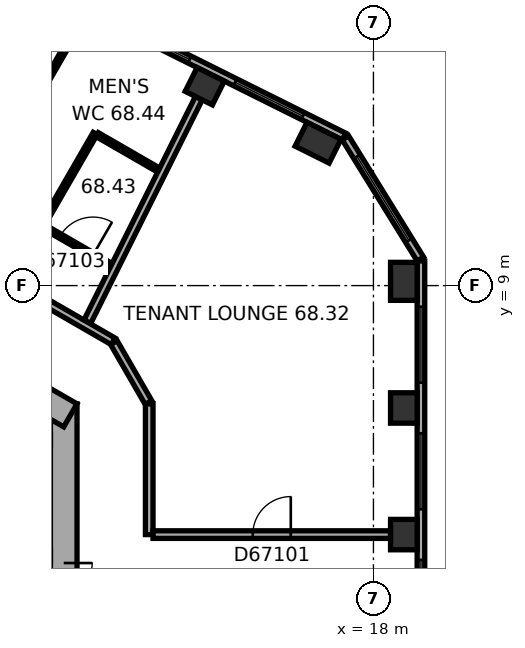
"""IFC4 building model, lengths in metres.
Left out: names, types, materials, properties, quantities, classifications, styles, units other than length and angle.
Written with IfcOpenShell. Run it as: python <this file> out.ifc"""

import sys

from ifc_helpers import new_model, si_unit, direction, frame, frame_2d, origin, origin_2d, place, context, subcontext, project, spatial, rectangle, extrude, element, fill, save


model = new_model("IFC4")
c1 = context("Model", 3, precision=1e-05, world=origin(), true_north=direction((0.0, 1.0)))
c2 = subcontext(c1, "Body", "Model", "MODEL_VIEW")
j1 = project(units=[si_unit("LENGTHUNIT", "METRE"), si_unit("PLANEANGLEUNIT", "RADIAN")], contexts=[c1])
p1 = place(None, origin())
s1 = spatial("IfcSite", under=j1, at=p1, CompositionType="ELEMENT")
p2 = place(p1, origin())
s2 = spatial("IfcBuilding", under=s1, at=p2, CompositionType="ELEMENT")
p3 = place(p2, frame((0.0, 0.0, 274.6)))
s3 = spatial("IfcBuildingStorey", under=s2, at=p3, CompositionType="ELEMENT", Elevation=274.6)
for number, where, z_axis, x_axis in (
    (1, (18.8, 2.448, 0.0), (0.0, 0.0, 1.0), (0.0, 1.0, 0.0)),
    (2, (18.8, 5.78, 0.0), (0.0, 0.0, 1.0), (0.0, 1.0, 0.0)),
):
    element("IfcColumn", number, at=place(p3, frame(where, z_axis=z_axis, x_axis=x_axis)), inside=s3, PredefinedType="COLUMN", context=c2, shape_type="SweptSolid", body=[
        extrude(rectangle(XDim=0.8, YDim=0.7, at=origin_2d()), origin(), (0.0, 0.0, 1.0), 3.7),
    ])
for number, where, z_axis, x_axis in (
    (3, (18.8, 9.112, 0.0), (0.0, 0.0, 1.0), (0.0, 1.0, 0.0)),
    (4, (16.543, 12.759, 0.0), (0.0, 0.0, 1.0), (-0.895, 0.446, 0.0)),
):
    element("IfcColumn", number, at=place(p3, frame(where, z_axis=z_axis, x_axis=x_axis)), inside=s3, PredefinedType="COLUMN", context=c2, shape_type="SweptSolid", body=[
        extrude(rectangle(XDim=1.0, YDim=0.7, at=origin_2d()), origin(), (0.0, 0.0, 1.0), 3.7),
    ])
p4 = place(p3, frame((13.561, 14.246, 0.0), z_axis=(0.0, 0.0, 1.0), x_axis=(-0.894934361602, 0.44619781311, 0.0)))
e5 = element("IfcColumn", 5, at=p4, inside=s3, PredefinedType="COLUMN", context=c2, shape_type="SweptSolid", body=[
    extrude(rectangle(XDim=0.8, YDim=0.7, at=origin_2d()), origin(), (0.0, 0.0, 1.0), 3.7),
])
p5 = place(p3, frame((9.85, -5.889, 0.0), z_axis=(0.0, 0.0, 1.0), x_axis=(0.0, 1.0, 0.0)))
e6 = element("IfcWall", 6, at=p5, inside=s3, PredefinedType="SHEAR", context=c2, shape_type="SweptSolid", body=[
    extrude(rectangle(XDim=11.778, YDim=0.7, at=frame_2d((5.889, 0.0))), origin(), (0.0, 0.0, 1.0), 3.7),
])
p6 = place(p5, frame((6.089, 0.0, 0.0)))
e7 = element("IfcOpeningElement", 7, at=p6, cuts=e6, PredefinedType="OPENING", context=c2, shape_type="SweptSolid", body=[
    extrude(rectangle(XDim=1.5, YDim=2.1, at=frame_2d((0.75, 1.05))), frame((0.0, 0.36, 0.0), z_axis=(0.0, -1.0, 0.0), x_axis=(1.0, 0.0, 0.0)), (0.0, 0.0, 1.0), 0.72),
])
p7 = place(p5, frame((1.639, 0.0, 0.0)))
e8 = element("IfcOpeningElement", 8, at=p7, cuts=e6, PredefinedType="OPENING", context=c2, shape_type="SweptSolid", body=[
    extrude(rectangle(XDim=0.9, YDim=2.1, at=frame_2d((0.45, 1.05))), frame((0.0, 0.36, 0.0), z_axis=(0.0, -1.0, 0.0), x_axis=(1.0, 0.0, 0.0)), (0.0, 0.0, 1.0), 0.72),
])
p8 = place(p5, frame((4.239, 0.0, 0.0)))
e9 = element("IfcOpeningElement", 9, at=p8, cuts=e6, PredefinedType="OPENING", context=c2, shape_type="SweptSolid", body=[
    extrude(rectangle(XDim=0.9, YDim=2.1, at=frame_2d((0.45, 1.05))), frame((0.0, 0.36, 0.0), z_axis=(0.0, -1.0, 0.0), x_axis=(1.0, 0.0, 0.0)), (0.0, 0.0, 1.0), 0.72),
])
p9 = place(p3, frame((10.025, 5.586, 0.0), z_axis=(0.0, 0.0, 1.0), x_axis=(-0.866026453023, 0.499998182661, 0.0)))
e10 = element("IfcWall", 10, at=p9, inside=s3, PredefinedType="SHEAR", context=c2, shape_type="SweptSolid", body=[
    extrude(rectangle(XDim=11.778, YDim=0.7, at=frame_2d((5.889, 0.0))), origin(), (0.0, 0.0, 1.0), 3.7),
])
p10 = place(p9, frame((5.139, 0.0, 0.0)))
e11 = element("IfcOpeningElement", 11, at=p10, cuts=e10, PredefinedType="OPENING", context=c2, shape_type="SweptSolid", body=[
    extrude(rectangle(XDim=0.9, YDim=2.1, at=frame_2d((0.45, 1.05))), frame((0.0, 0.36, 0.0), z_axis=(0.0, -1.0, 0.0), x_axis=(1.0, 0.0, 0.0)), (0.0, 0.0, 1.0), 0.72),
])
p11 = place(p3, frame((19.25, -8.084, 0.0), z_axis=(0.0, 0.0, 1.0), x_axis=(0.0, 1.0, 0.0)))
e12 = element("IfcWall", 12, at=p11, inside=s3, PredefinedType="STANDARD", context=c2, shape_type="SweptSolid", body=[
    extrude(rectangle(XDim=17.731, YDim=0.2, at=frame_2d((8.866, 0.0))), origin(), (0.0, 0.0, 1.0), 3.7),
])
p12 = place(p11, frame((1.203, 0.0, 0.9)))
e13 = element("IfcOpeningElement", 13, at=p12, cuts=e12, PredefinedType="OPENING", context=c2, shape_type="SweptSolid", body=[
    extrude(rectangle(XDim=2.0, YDim=2.0, at=frame_2d((1.0, 1.0))), frame((0.0, 0.11, 0.0), z_axis=(0.0, -1.0, 0.0), x_axis=(1.0, 0.0, 0.0)), (0.0, 0.0, 1.0), 0.22),
])
p13 = place(p11, frame((4.535, 0.0, 0.9)))
e14 = element("IfcOpeningElement", 14, at=p13, cuts=e12, PredefinedType="OPENING", context=c2, shape_type="SweptSolid", body=[
    extrude(rectangle(XDim=2.0, YDim=2.0, at=frame_2d((1.0, 1.0))), frame((0.0, 0.11, 0.0), z_axis=(0.0, -1.0, 0.0), x_axis=(1.0, 0.0, 0.0)), (0.0, 0.0, 1.0), 0.22),
])
p14 = place(p11, frame((7.866, 0.0, 0.9)))
e15 = element("IfcOpeningElement", 15, at=p14, cuts=e12, PredefinedType="OPENING", context=c2, shape_type="SweptSolid", body=[
    extrude(rectangle(XDim=2.0, YDim=2.0, at=frame_2d((1.0, 1.0))), frame((0.0, 0.11, 0.0), z_axis=(0.0, -1.0, 0.0), x_axis=(1.0, 0.0, 0.0)), (0.0, 0.0, 1.0), 0.22),
])
p15 = place(p11, frame((11.198, 0.0, 0.9)))
e16 = element("IfcOpeningElement", 16, at=p15, cuts=e12, PredefinedType="OPENING", context=c2, shape_type="SweptSolid", body=[
    extrude(rectangle(XDim=2.0, YDim=2.0, at=frame_2d((1.0, 1.0))), frame((0.0, 0.11, 0.0), z_axis=(0.0, -1.0, 0.0), x_axis=(1.0, 0.0, 0.0)), (0.0, 0.0, 1.0), 0.22),
])
p16 = place(p11, frame((14.53, 0.0, 0.9)))
e17 = element("IfcOpeningElement", 17, at=p16, cuts=e12, PredefinedType="OPENING", context=c2, shape_type="SweptSolid", body=[
    extrude(rectangle(XDim=2.0, YDim=2.0, at=frame_2d((1.0, 1.0))), frame((0.0, 0.11, 0.0), z_axis=(0.0, -1.0, 0.0), x_axis=(1.0, 0.0, 0.0)), (0.0, 0.0, 1.0), 0.22),
])
p17 = place(p3, frame((19.235, 9.7, 0.0), z_axis=(0.0, 0.0, 1.0), x_axis=(-0.526233475464, 0.850340125656, 0.0)))
e18 = element("IfcWall", 18, at=p17, inside=s3, PredefinedType="STANDARD", context=c2, shape_type="SweptSolid", body=[
    extrude(rectangle(XDim=3.747, YDim=0.2, at=frame_2d((1.874, 0.0))), origin(), (0.0, 0.0, 1.0), 3.7),
])
p18 = place(p17, frame((0.573, 0.0, 0.9)))
e19 = element("IfcOpeningElement", 19, at=p18, cuts=e18, PredefinedType="OPENING", context=c2, shape_type="SweptSolid", body=[
    extrude(rectangle(XDim=2.6, YDim=2.0, at=frame_2d((1.3, 1.0))), frame((0.0, 0.11, 0.0), z_axis=(0.0, -1.0, 0.0), x_axis=(1.0, 0.0, 0.0)), (0.0, 0.0, 1.0), 0.22),
])
p19 = place(p3, frame((17.223, 12.923, 0.0), z_axis=(0.0, 0.0, 1.0), x_axis=(-0.894930561148, 0.44620543556, 0.0)))
e20 = element("IfcWall", 20, at=p19, inside=s3, PredefinedType="STANDARD", context=c2, shape_type="SweptSolid", body=[
    extrude(rectangle(XDim=17.731, YDim=0.2, at=frame_2d((8.866, 0.0))), origin(), (0.0, 0.0, 1.0), 3.7),
])
p20 = place(p19, frame((1.202, 0.0, 0.9)))
e21 = element("IfcOpeningElement", 21, at=p20, cuts=e20, PredefinedType="OPENING", context=c2, shape_type="SweptSolid", body=[
    extrude(rectangle(XDim=2.0, YDim=2.0, at=frame_2d((1.0, 1.0))), frame((0.0, 0.11, 0.0), z_axis=(0.0, -1.0, 0.0), x_axis=(1.0, 0.0, 0.0)), (0.0, 0.0, 1.0), 0.22),
])
p21 = place(p19, frame((4.533, 0.0, 0.9)))
e22 = element("IfcOpeningElement", 22, at=p21, cuts=e20, PredefinedType="OPENING", context=c2, shape_type="SweptSolid", body=[
    extrude(rectangle(XDim=2.0, YDim=2.0, at=frame_2d((1.0, 1.0))), frame((0.0, 0.11, 0.0), z_axis=(0.0, -1.0, 0.0), x_axis=(1.0, 0.0, 0.0)), (0.0, 0.0, 1.0), 0.22),
])
p22 = place(p19, frame((7.865, 0.0, 0.9)))
e23 = element("IfcOpeningElement", 23, at=p22, cuts=e20, PredefinedType="OPENING", context=c2, shape_type="SweptSolid", body=[
    extrude(rectangle(XDim=2.0, YDim=2.0, at=frame_2d((1.0, 1.0))), frame((0.0, 0.11, 0.0), z_axis=(0.0, -1.0, 0.0), x_axis=(1.0, 0.0, 0.0)), (0.0, 0.0, 1.0), 0.22),
])
p23 = place(p19, frame((11.197, 0.0, 0.9)))
e24 = element("IfcOpeningElement", 24, at=p23, cuts=e20, PredefinedType="OPENING", context=c2, shape_type="SweptSolid", body=[
    extrude(rectangle(XDim=2.0, YDim=2.0, at=frame_2d((1.0, 1.0))), frame((0.0, 0.11, 0.0), z_axis=(0.0, -1.0, 0.0), x_axis=(1.0, 0.0, 0.0)), (0.0, 0.0, 1.0), 0.22),
])
p24 = place(p19, frame((14.528, 0.0, 0.9)))
e25 = element("IfcOpeningElement", 25, at=p24, cuts=e20, PredefinedType="OPENING", context=c2, shape_type="SweptSolid", body=[
    extrude(rectangle(XDim=2.0, YDim=2.0, at=frame_2d((1.0, 1.0))), frame((0.0, 0.11, 0.0), z_axis=(0.0, -1.0, 0.0), x_axis=(1.0, 0.0, 0.0)), (0.0, 0.0, 1.0), 0.22),
])
p25 = place(p3, frame((10.091, 15.585, 0.0), z_axis=(0.0, 0.0, 1.0), x_axis=(-0.499969186147, -0.86604319344, 0.0)))
e26 = element("IfcWall", 26, at=p25, inside=s3, PredefinedType="PARTITIONING", context=c2, shape_type="SweptSolid", body=[
    extrude(rectangle(XDim=4.682, YDim=0.12, at=frame_2d((2.341, 0.0))), origin(), (0.0, 0.0, 1.0), 2.65),
])
p26 = place(p3, frame((10.679, 13.003, 0.0), z_axis=(0.0, 0.0, 1.0), x_axis=(-0.500048966069, -0.865997131366, 0.0)))
e27 = element("IfcWall", 27, at=p26, inside=s3, PredefinedType="PARTITIONING", context=c2, shape_type="SweptSolid", body=[
    extrude(rectangle(XDim=2.74, YDim=0.12, at=frame_2d((1.37, 0.0))), origin(), (0.0, 0.0, 1.0), 3.35),
])
p27 = place(p3, frame((11.097, 9.528, 0.0), z_axis=(0.0, 0.0, 1.0), x_axis=(-0.866039938485, 0.499974824316, 0.0)))
e28 = element("IfcWall", 28, at=p27, inside=s3, PredefinedType="PARTITIONING", context=c2, shape_type="SweptSolid", body=[
    extrude(rectangle(XDim=6.476, YDim=0.12, at=frame_2d((3.238, 0.0))), origin(), (0.0, 0.0, 1.0), 3.35),
])
p28 = place(p27, frame((0.55, 0.0, 0.0)))
e29 = element("IfcOpeningElement", 29, at=p28, cuts=e28, PredefinedType="OPENING", context=c2, shape_type="SweptSolid", body=[
    extrude(rectangle(XDim=1.0, YDim=2.1, at=frame_2d((0.5, 1.05))), frame((0.0, 0.07, 0.0), z_axis=(0.0, -1.0, 0.0), x_axis=(1.0, 0.0, 0.0)), (0.0, 0.0, 1.0), 0.14),
])
p29 = place(p27, frame((2.55, 0.0, 0.0)))
e30 = element("IfcOpeningElement", 30, at=p29, cuts=e28, PredefinedType="OPENING", context=c2, shape_type="SweptSolid", body=[
    extrude(rectangle(XDim=0.9, YDim=2.1, at=frame_2d((0.45, 1.05))), frame((0.0, 0.07, 0.0), z_axis=(0.0, -1.0, 0.0), x_axis=(1.0, 0.0, 0.0)), (0.0, 0.0, 1.0), 0.14),
])
p30 = place(p27, frame((4.738, 0.0, 0.0)))
e31 = element("IfcOpeningElement", 31, at=p30, cuts=e28, PredefinedType="OPENING", context=c2, shape_type="SweptSolid", body=[
    extrude(rectangle(XDim=0.9, YDim=2.1, at=frame_2d((0.45, 1.05))), frame((0.0, 0.07, 0.0), z_axis=(0.0, -1.0, 0.0), x_axis=(1.0, 0.0, 0.0)), (0.0, 0.0, 1.0), 0.14),
])
p31 = place(p3, frame((11.15, 7.534, 0.0), z_axis=(0.0, 0.0, 1.0), x_axis=(-0.866026603062, 0.499997922785, 0.0)))
e32 = element("IfcWall", 32, at=p31, inside=s3, PredefinedType="PARTITIONING", context=c2, shape_type="SweptSolid", body=[
    extrude(rectangle(XDim=11.738, YDim=0.2, at=frame_2d((5.869, 0.0))), origin(), (0.0, 0.0, 1.0), 3.35),
])
p32 = place(p31, frame((3.676, 0.0, 0.0)))
e33 = element("IfcOpeningElement", 33, at=p32, cuts=e32, PredefinedType="OPENING", context=c2, shape_type="SweptSolid", body=[
    extrude(rectangle(XDim=1.0, YDim=2.1, at=frame_2d((0.5, 1.05))), frame((0.0, 0.11, 0.0), z_axis=(0.0, -1.0, 0.0), x_axis=(1.0, 0.0, 0.0)), (0.0, 0.0, 1.0), 0.22),
])
p33 = place(p3, frame((12.08, 5.924, 0.0), z_axis=(0.0, 0.0, 1.0), x_axis=(-0.500004960326, 0.86602253992, 0.0)))
e34 = element("IfcWall", 34, at=p33, inside=s3, PredefinedType="PARTITIONING", context=c2, shape_type="SweptSolid", body=[
    extrude(rectangle(XDim=1.82, YDim=0.2, at=frame_2d((0.91, 0.0))), origin(), (0.0, 0.0, 1.0), 3.35),
])
p34 = place(p3, frame((12.1, 2.448, 0.0), z_axis=(0.0, 0.0, 1.0), x_axis=(0.0, 1.0, 0.0)))
e35 = element("IfcWall", 35, at=p34, inside=s3, PredefinedType="PARTITIONING", context=c2, shape_type="SweptSolid", body=[
    extrude(rectangle(XDim=3.441, YDim=0.2, at=frame_2d((1.72, 0.0))), origin(), (0.0, 0.0, 1.0), 3.35),
])
p35 = place(p3, frame((12.349, 12.038, 0.0), z_axis=(0.0, 0.0, 1.0), x_axis=(-0.866039825209, 0.499975020527, 0.0)))
e36 = element("IfcWall", 36, at=p35, inside=s3, PredefinedType="PARTITIONING", context=c2, shape_type="SweptSolid", body=[
    extrude(rectangle(XDim=1.869, YDim=0.12, at=frame_2d((0.934, 0.0))), origin(), (0.0, 0.0, 1.0), 3.35),
])
p36 = place(p3, frame((13.405, 13.933, 0.0), z_axis=(0.0, 0.0, 1.0), x_axis=(-0.446187838644, -0.894939334618, 0.0)))
e37 = element("IfcWall", 37, at=p36, inside=s3, PredefinedType="PARTITIONING", context=c2, shape_type="SweptSolid", body=[
    extrude(rectangle(XDim=6.571, YDim=0.2, at=frame_2d((3.286, 0.0))), origin(), (0.0, 0.0, 1.0), 3.35),
])
p37 = place(p3, frame((18.45, 2.448, 0.0), z_axis=(0.0, 0.0, 1.0), x_axis=(-1.0, 0.0, 0.0)))
e38 = element("IfcWall", 38, at=p37, inside=s3, PredefinedType="PARTITIONING", context=c2, shape_type="SweptSolid", body=[
    extrude(rectangle(XDim=6.25, YDim=0.2, at=frame_2d((3.125, 0.0))), origin(), (0.0, 0.0, 1.0), 3.35),
])
p38 = place(p37, frame((2.625, 0.0, 0.0)))
e39 = element("IfcOpeningElement", 39, at=p38, cuts=e38, PredefinedType="OPENING", context=c2, shape_type="SweptSolid", body=[
    extrude(rectangle(XDim=1.0, YDim=2.1, at=frame_2d((0.5, 1.05))), frame((0.0, 0.11, 0.0), z_axis=(0.0, -1.0, 0.0), x_axis=(1.0, 0.0, 0.0)), (0.0, 0.0, 1.0), 0.22),
])
p39 = place(p14, origin())
e40 = element("IfcWindow", 40, at=p39, inside=s3, PartitioningType="SINGLE_PANEL", PredefinedType="WINDOW", context=c2, shape_type="SweptSolid", body=[
    extrude(rectangle(XDim=2.0, YDim=2.0, at=frame_2d((1.0, 1.0))), frame((0.0, 0.03, 0.0), z_axis=(0.0, -1.0, 0.0), x_axis=(1.0, 0.0, 0.0)), (0.0, 0.0, 1.0), 0.06),
])
fill(e15, e40)
p40 = place(p15, origin())
e41 = element("IfcWindow", 41, at=p40, inside=s3, PartitioningType="SINGLE_PANEL", PredefinedType="WINDOW", context=c2, shape_type="SweptSolid", body=[
    extrude(rectangle(XDim=2.0, YDim=2.0, at=frame_2d((1.0, 1.0))), frame((0.0, 0.03, 0.0), z_axis=(0.0, -1.0, 0.0), x_axis=(1.0, 0.0, 0.0)), (0.0, 0.0, 1.0), 0.06),
])
fill(e16, e41)
p41 = place(p16, origin())
e42 = element("IfcWindow", 42, at=p41, inside=s3, PartitioningType="SINGLE_PANEL", PredefinedType="WINDOW", context=c2, shape_type="SweptSolid", body=[
    extrude(rectangle(XDim=2.0, YDim=2.0, at=frame_2d((1.0, 1.0))), frame((0.0, 0.03, 0.0), z_axis=(0.0, -1.0, 0.0), x_axis=(1.0, 0.0, 0.0)), (0.0, 0.0, 1.0), 0.06),
])
fill(e17, e42)
p42 = place(p18, origin())
e43 = element("IfcWindow", 43, at=p42, inside=s3, PartitioningType="SINGLE_PANEL", PredefinedType="WINDOW", context=c2, shape_type="SweptSolid", body=[
    extrude(rectangle(XDim=2.6, YDim=2.0, at=frame_2d((1.3, 1.0))), frame((0.0, 0.03, 0.0), z_axis=(0.0, -1.0, 0.0), x_axis=(1.0, 0.0, 0.0)), (0.0, 0.0, 1.0), 0.06),
])
fill(e19, e43)
p43 = place(p20, origin())
e44 = element("IfcWindow", 44, at=p43, inside=s3, PartitioningType="SINGLE_PANEL", PredefinedType="WINDOW", context=c2, shape_type="SweptSolid", body=[
    extrude(rectangle(XDim=2.0, YDim=2.0, at=frame_2d((1.0, 1.0))), frame((0.0, 0.03, 0.0), z_axis=(0.0, -1.0, 0.0), x_axis=(1.0, 0.0, 0.0)), (0.0, 0.0, 1.0), 0.06),
])
fill(e21, e44)
p44 = place(p21, origin())
e45 = element("IfcWindow", 45, at=p44, inside=s3, PartitioningType="SINGLE_PANEL", PredefinedType="WINDOW", context=c2, shape_type="SweptSolid", body=[
    extrude(rectangle(XDim=2.0, YDim=2.0, at=frame_2d((1.0, 1.0))), frame((0.0, 0.03, 0.0), z_axis=(0.0, -1.0, 0.0), x_axis=(1.0, 0.0, 0.0)), (0.0, 0.0, 1.0), 0.06),
])
fill(e22, e45)
p45 = place(p6, origin())
e46 = element("IfcDoor", 46, at=p45, inside=s3, OperationType="DOUBLE_DOOR_SINGLE_SWING", PredefinedType="DOOR", context=c2, shape_type="SweptSolid", body=[
    extrude(rectangle(XDim=1.5, YDim=2.1, at=frame_2d((0.75, 1.05))), frame((0.0, 0.025, 0.0), z_axis=(0.0, -1.0, 0.0), x_axis=(1.0, 0.0, 0.0)), (0.0, 0.0, 1.0), 0.05),
])
fill(e7, e46)
p46 = place(p38, origin())
e47 = element("IfcDoor", 47, at=p46, inside=s3, OperationType="SINGLE_SWING_LEFT", PredefinedType="DOOR", context=c2, shape_type="SweptSolid", body=[
    extrude(rectangle(XDim=1.0, YDim=2.1, at=frame_2d((0.5, 1.05))), frame((0.0, 0.025, 0.0), z_axis=(0.0, -1.0, 0.0), x_axis=(1.0, 0.0, 0.0)), (0.0, 0.0, 1.0), 0.05),
])
fill(e39, e47)
p47 = place(p28, origin())
e48 = element("IfcDoor", 48, at=p47, inside=s3, OperationType="SINGLE_SWING_LEFT", PredefinedType="DOOR", context=c2, shape_type="SweptSolid", body=[
    extrude(rectangle(XDim=1.0, YDim=2.1, at=frame_2d((0.5, 1.05))), frame((0.0, 0.025, 0.0), z_axis=(0.0, -1.0, 0.0), x_axis=(1.0, 0.0, 0.0)), (0.0, 0.0, 1.0), 0.05),
])
fill(e29, e48)
save(model, sys.argv[1])
